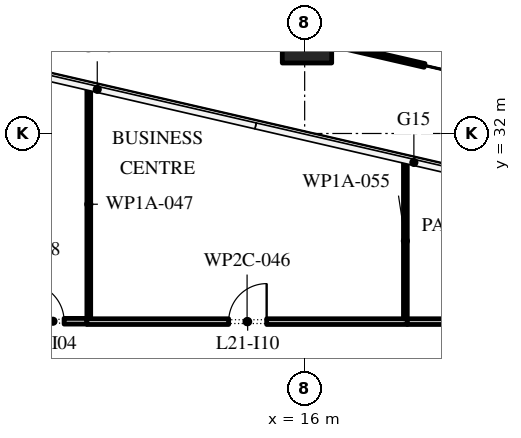
"""IFC4 building model, lengths in metres.
Left out: names, types, materials, properties, quantities, classifications, styles, units other than length and angle.
Written with IfcOpenShell. Run it as: python <this file> out.ifc"""

import sys

from ifc_helpers import new_model, si_unit, direction, frame, frame_2d, origin, origin_2d, place, context, subcontext, project, spatial, rectangle, extrude, element, fill, save


model = new_model("IFC4")
c1 = context("Model", 3, precision=1e-05, world=origin(), true_north=direction((0.0, 1.0)))
c2 = subcontext(c1, "Body", "Model", "MODEL_VIEW")
j1 = project(units=[si_unit("LENGTHUNIT", "METRE"), si_unit("PLANEANGLEUNIT", "RADIAN")], contexts=[c1])
p1 = place(None, origin())
s1 = spatial("IfcSite", under=j1, at=p1, CompositionType="ELEMENT")
p2 = place(p1, origin())
s2 = spatial("IfcBuilding", under=s1, at=p2, CompositionType="ELEMENT")
p3 = place(p2, frame((0.0, 0.0, 99.6)))
s3 = spatial("IfcBuildingStorey", under=s2, at=p3, CompositionType="ELEMENT", Elevation=99.6)
p4 = place(p3, frame((16.061, 34.505, 0.0), z_axis=(0.02038305527, 0.088218511577, 0.995892577175), x_axis=(-0.97433081589, 0.225120992372, 0.0)))
e1 = element("IfcColumn", 1, at=p4, inside=s3, PredefinedType="COLUMN", context=c2, shape_type="SweptSolid", body=[
    extrude(rectangle(XDim=1.3, YDim=1.3, at=origin_2d()), origin(), (0.0, 0.0, 1.0), 6.025),
])
p5 = place(p3, frame((24.519, 32.552, 0.0), z_axis=(0.0, 0.0, 1.0), x_axis=(-0.974372699143, 0.224939643383, 0.0)))
e2 = element("IfcWall", 2, at=p5, inside=s3, PredefinedType="STANDARD", context=c2, shape_type="SweptSolid", body=[
    extrude(rectangle(XDim=8.01, YDim=0.1, at=frame_2d((4.005, 0.0))), origin(), (0.0, 0.0, 1.0), 5.8),
])
p6 = place(p5, frame((2.505, 0.0, 0.0)))
e3 = element("IfcOpeningElement", 3, at=p6, cuts=e2, PredefinedType="OPENING", context=c2, shape_type="SweptSolid", body=[
    extrude(rectangle(XDim=3.0, YDim=3.5, at=frame_2d((1.5, 1.75))), frame((0.0, 0.06, 0.0), z_axis=(0.0, -1.0, 0.0), x_axis=(1.0, 0.0, 0.0)), (0.0, 0.0, 1.0), 0.12),
])
p7 = place(p3, frame((8.485, 27.06, 0.0), z_axis=(0.0, 0.0, 1.0), x_axis=(1.0, 0.0, 0.0)))
e4 = element("IfcWall", 4, at=p7, inside=s3, PredefinedType="PARTITIONING", context=c2, shape_type="SweptSolid", body=[
    extrude(rectangle(XDim=1.785, YDim=0.15, at=frame_2d((0.893, 0.0))), origin(), (0.0, 0.0, 1.0), 5.8),
])
p8 = place(p7, frame((0.185, 0.0, 0.0)))
e5 = element("IfcOpeningElement", 5, at=p8, cuts=e4, PredefinedType="OPENING", context=c2, shape_type="SweptSolid", body=[
    extrude(rectangle(XDim=1.0, YDim=2.1, at=frame_2d((0.5, 1.05))), frame((0.0, 0.085, 0.0), z_axis=(0.0, -1.0, 0.0), x_axis=(1.0, 0.0, 0.0)), (0.0, 0.0, 1.0), 0.17),
])
p9 = place(p3, frame((10.27, 27.05, 0.0), z_axis=(0.0, 0.0, 1.0), x_axis=(1.0, 0.0, 0.0)))
e6 = element("IfcWall", 6, at=p9, inside=s3, PredefinedType="PARTITIONING", context=c2, shape_type="SweptSolid", body=[
    extrude(rectangle(XDim=8.43, YDim=0.15, at=frame_2d((4.215, 0.0))), origin(), (0.0, 0.0, 1.0), 5.8),
])
p10 = place(p9, frame((3.73, 0.0, 0.0)))
e7 = element("IfcOpeningElement", 7, at=p10, cuts=e6, PredefinedType="OPENING", context=c2, shape_type="SweptSolid", body=[
    extrude(rectangle(XDim=1.0, YDim=2.1, at=frame_2d((0.5, 1.05))), frame((0.0, 0.085, 0.0), z_axis=(0.0, -1.0, 0.0), x_axis=(1.0, 0.0, 0.0)), (0.0, 0.0, 1.0), 0.17),
])
p11 = place(p3, frame((10.32, 33.142, 0.0), z_axis=(0.0, 0.0, 1.0), x_axis=(0.0, -1.0, 0.0)))
e8 = element("IfcWall", 8, at=p11, inside=s3, PredefinedType="PARTITIONING", context=c2, shape_type="SweptSolid", body=[
    extrude(rectangle(XDim=6.007, YDim=0.1, at=frame_2d((3.003, 0.0))), origin(), (0.0, 0.0, 1.0), 5.8),
])
p12 = place(p3, frame((18.7, 27.05, 0.0), z_axis=(0.0, 0.0, 1.0), x_axis=(1.0, 0.0, 0.0)))
e9 = element("IfcWall", 9, at=p12, inside=s3, PredefinedType="PARTITIONING", context=c2, shape_type="SweptSolid", body=[
    extrude(rectangle(XDim=4.36, YDim=0.15, at=frame_2d((2.18, 0.0))), origin(), (0.0, 0.0, 1.0), 5.8),
])
p13 = place(p12, frame((1.66, 0.0, 0.0)))
e10 = element("IfcOpeningElement", 10, at=p13, cuts=e9, PredefinedType="OPENING", context=c2, shape_type="SweptSolid", body=[
    extrude(rectangle(XDim=1.0, YDim=2.1, at=frame_2d((0.5, 1.05))), frame((0.0, 0.085, 0.0), z_axis=(0.0, -1.0, 0.0), x_axis=(1.0, 0.0, 0.0)), (0.0, 0.0, 1.0), 0.17),
])
p14 = place(p3, frame((18.65, 31.219, 0.0), z_axis=(0.0, 0.0, 1.0), x_axis=(0.0, -1.0, 0.0)))
e11 = element("IfcWall", 11, at=p14, inside=s3, PredefinedType="PARTITIONING", context=c2, shape_type="SweptSolid", body=[
    extrude(rectangle(XDim=4.094, YDim=0.1, at=frame_2d((2.047, 0.0))), origin(), (0.0, 0.0, 1.0), 5.8),
])
p15 = place(p6, origin())
e12 = element("IfcDoor", 12, at=p15, inside=s3, OperationType="DOUBLE_DOOR_SLIDING", PredefinedType="DOOR", context=c2, shape_type="SweptSolid", body=[
    extrude(rectangle(XDim=3.0, YDim=3.5, at=frame_2d((1.5, 1.75))), frame((0.0, 0.025, 0.0), z_axis=(0.0, -1.0, 0.0), x_axis=(1.0, 0.0, 0.0)), (0.0, 0.0, 1.0), 0.05),
])
fill(e3, e12)
p16 = place(p8, origin())
e13 = element("IfcDoor", 13, at=p16, inside=s3, OperationType="SINGLE_SWING_RIGHT", PredefinedType="DOOR", context=c2, shape_type="SweptSolid", body=[
    extrude(rectangle(XDim=1.0, YDim=2.1, at=frame_2d((0.5, 1.05))), frame((0.0, 0.025, 0.0), z_axis=(0.0, -1.0, 0.0), x_axis=(1.0, 0.0, 0.0)), (0.0, 0.0, 1.0), 0.05),
])
fill(e5, e13)
p17 = place(p10, origin())
e14 = element("IfcDoor", 14, at=p17, inside=s3, OperationType="SINGLE_SWING_LEFT", PredefinedType="DOOR", context=c2, shape_type="SweptSolid", body=[
    extrude(rectangle(XDim=1.0, YDim=2.1, at=frame_2d((0.5, 1.05))), frame((0.0, 0.025, 0.0), z_axis=(0.0, -1.0, 0.0), x_axis=(1.0, 0.0, 0.0)), (0.0, 0.0, 1.0), 0.05),
])
fill(e7, e14)
save(model, sys.argv[1])
